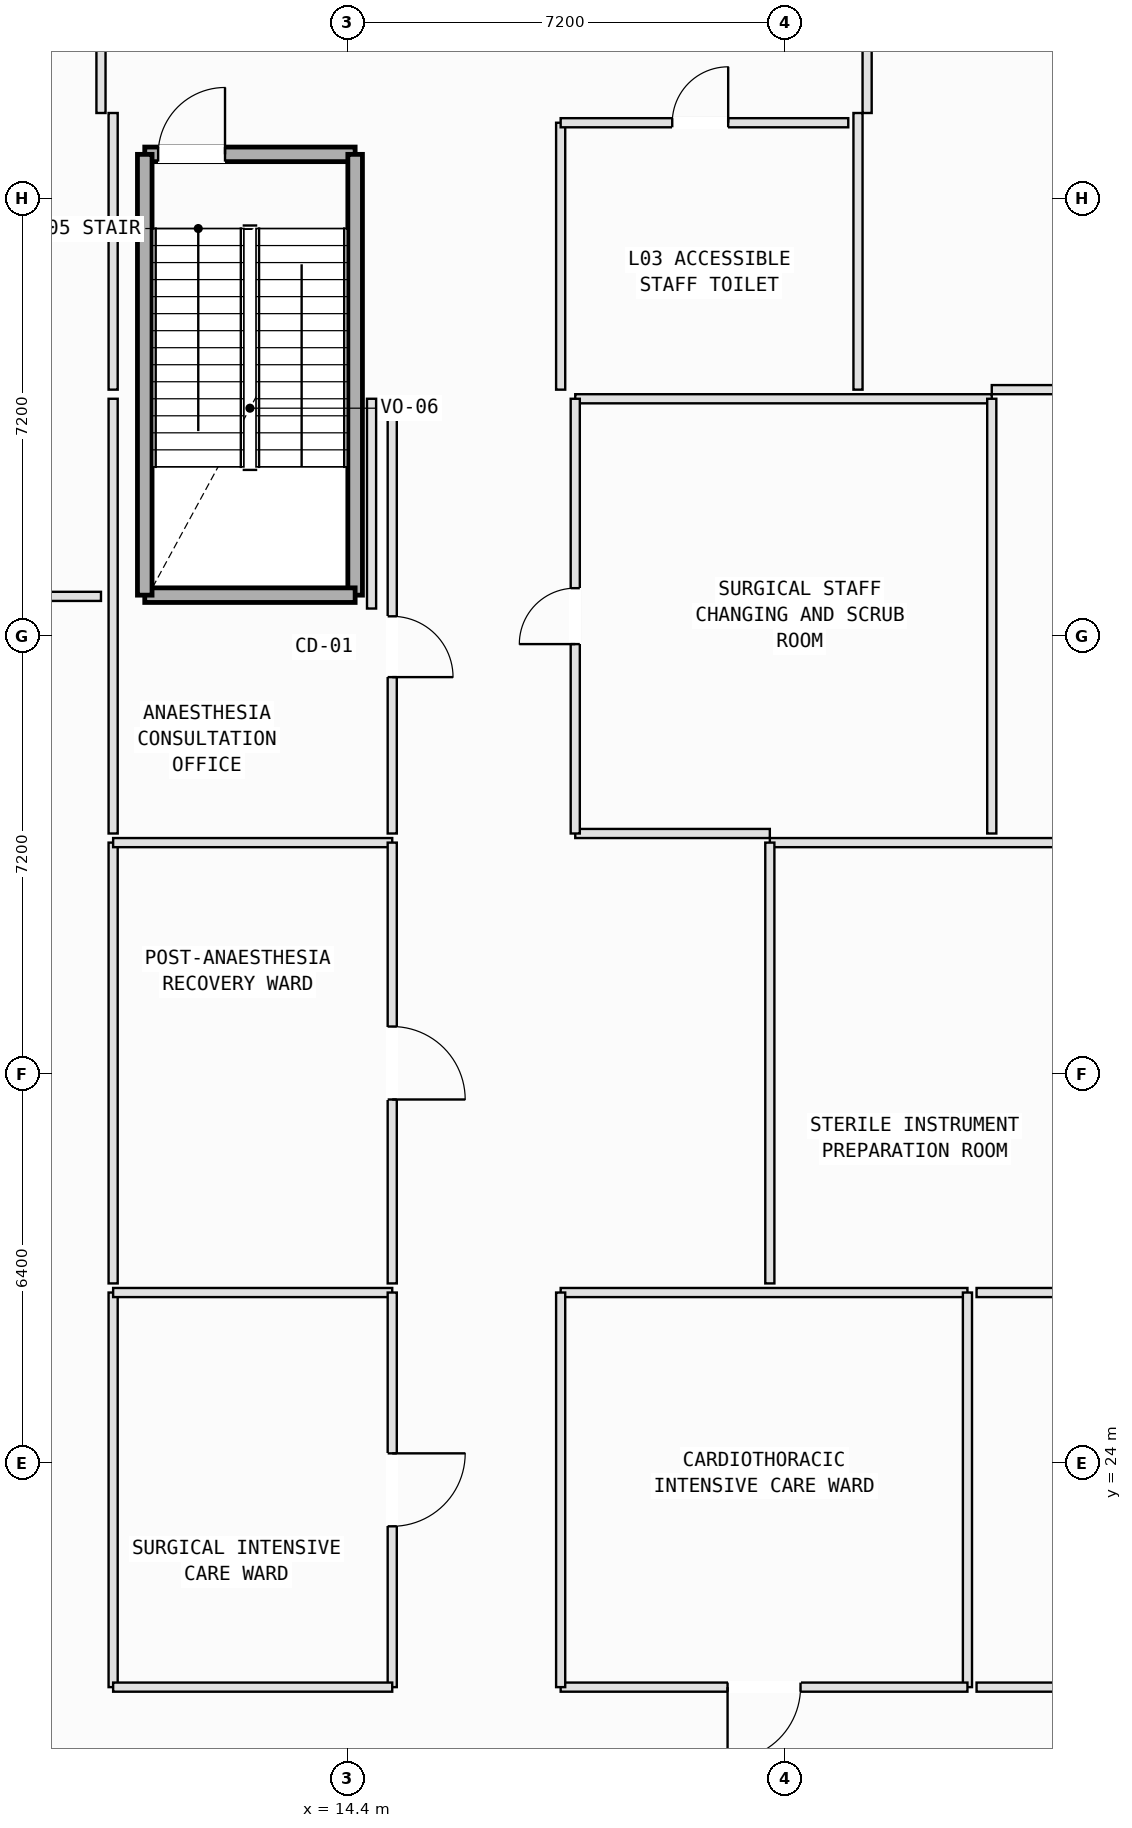
"""IFC4 building model, lengths in metres.
Left out: names, types, materials, properties, quantities, classifications, styles, units other than length and angle.
Written with IfcOpenShell. Run it as: python <this file> out.ifc"""

import sys

from ifc_helpers import new_model, si_unit, direction, frame, frame_2d, origin, place, context, subcontext, project, spatial, rectangle, extrude, element, fill, save


model = new_model("IFC4")
c1 = context("Model", 3, precision=1e-05, world=origin(), true_north=direction((0.0, 1.0)))
c2 = subcontext(c1, "Body", "Model", "MODEL_VIEW")
j1 = project(units=[si_unit("LENGTHUNIT", "METRE"), si_unit("PLANEANGLEUNIT", "RADIAN")], contexts=[c1])
p1 = place(None, origin())
s1 = spatial("IfcSite", under=j1, at=p1, CompositionType="ELEMENT")
p2 = place(p1, origin())
s2 = spatial("IfcBuilding", under=s1, at=p2, CompositionType="ELEMENT")
p3 = place(p2, frame((0.0, 0.0, 16.2)))
s3 = spatial("IfcBuildingStorey", under=s2, at=p3, CompositionType="ELEMENT", Elevation=16.2)
p4 = place(p3, frame((11.07, 45.52, 0.0), z_axis=(0.0, 0.0, 1.0), x_axis=(1.0, 0.0, 0.0)))
e1 = element("IfcWall", 1, at=p4, inside=s3, PredefinedType="SOLIDWALL", context=c2, shape_type="SweptSolid", body=[
    extrude(rectangle(XDim=3.46, YDim=0.24, at=frame_2d((1.73, 0.0))), origin(), (0.0, 0.0, 1.0), 5.15),
])
p5 = place(p4, frame((0.22, 0.0, 0.0)))
e2 = element("IfcOpeningElement", 2, at=p5, cuts=e1, PredefinedType="OPENING", context=c2, shape_type="SweptSolid", body=[
    extrude(rectangle(XDim=1.1, YDim=2.15, at=frame_2d((0.55, 1.075))), frame((0.0, 0.13, 0.0), z_axis=(0.0, -1.0, 0.0), x_axis=(1.0, 0.0, 0.0)), (0.0, 0.0, 1.0), 0.26),
])
p6 = place(p3, frame((14.53, 45.52, 0.0), z_axis=(0.0, 0.0, 1.0), x_axis=(0.0, -1.0, 0.0)))
e3 = element("IfcWall", 3, at=p6, inside=s3, PredefinedType="SOLIDWALL", context=c2, shape_type="SweptSolid", body=[
    extrude(rectangle(XDim=7.25, YDim=0.24, at=frame_2d((3.625, 0.0))), origin(), (0.0, 0.0, 1.0), 5.15),
])
p7 = place(p3, frame((14.53, 38.27, 0.0), z_axis=(0.0, 0.0, 1.0), x_axis=(-1.0, 0.0, 0.0)))
e4 = element("IfcWall", 4, at=p7, inside=s3, PredefinedType="SOLIDWALL", context=c2, shape_type="SweptSolid", body=[
    extrude(rectangle(XDim=3.46, YDim=0.24, at=frame_2d((1.73, 0.0))), origin(), (0.0, 0.0, 1.0), 5.15),
])
p8 = place(p3, frame((11.07, 38.27, 0.0), z_axis=(0.0, 0.0, 1.0), x_axis=(0.0, 1.0, 0.0)))
e5 = element("IfcWall", 5, at=p8, inside=s3, PredefinedType="SOLIDWALL", context=c2, shape_type="SweptSolid", body=[
    extrude(rectangle(XDim=7.25, YDim=0.24, at=frame_2d((3.625, 0.0))), origin(), (0.0, 0.0, 1.0), 5.15),
])
p9 = place(p3, frame((10.55, 20.31, 0.0), z_axis=(0.0, 0.0, 1.0), x_axis=(0.0, 1.0, 0.0)))
e6 = element("IfcWall", 6, at=p9, inside=s3, PredefinedType="PARTITIONING", context=c2, shape_type="SweptSolid", body=[
    extrude(rectangle(XDim=6.49, YDim=0.15, at=frame_2d((3.245, 0.0))), origin(), (0.0, 0.0, 1.0), 5.15),
])
p10 = place(p3, frame((10.55, 26.8, 0.0), z_axis=(0.0, 0.0, 1.0), x_axis=(1.0, 0.0, 0.0)))
e7 = element("IfcWall", 7, at=p10, inside=s3, PredefinedType="PARTITIONING", context=c2, shape_type="SweptSolid", body=[
    extrude(rectangle(XDim=4.59, YDim=0.15, at=frame_2d((2.295, 0.0))), origin(), (0.0, 0.0, 1.0), 5.15),
])
p11 = place(p3, frame((15.14, 26.8, 0.0), z_axis=(0.0, 0.0, 1.0), x_axis=(0.0, -1.0, 0.0)))
e8 = element("IfcWall", 8, at=p11, inside=s3, PredefinedType="PARTITIONING", context=c2, shape_type="SweptSolid", body=[
    extrude(rectangle(XDim=6.49, YDim=0.15, at=frame_2d((3.245, 0.0))), origin(), (0.0, 0.0, 1.0), 5.15),
])
p12 = place(p11, frame((2.645, 0.0, 0.0)))
e9 = element("IfcOpeningElement", 9, at=p12, cuts=e8, PredefinedType="OPENING", context=c2, shape_type="SweptSolid", body=[
    extrude(rectangle(XDim=1.2, YDim=2.15, at=frame_2d((0.6, 1.075))), frame((0.0, 0.085, 0.0), z_axis=(0.0, -1.0, 0.0), x_axis=(1.0, 0.0, 0.0)), (0.0, 0.0, 1.0), 0.17),
])
p13 = place(p3, frame((15.14, 20.31, 0.0), z_axis=(0.0, 0.0, 1.0), x_axis=(-1.0, 0.0, 0.0)))
e10 = element("IfcWall", 10, at=p13, inside=s3, PredefinedType="PARTITIONING", context=c2, shape_type="SweptSolid", body=[
    extrude(rectangle(XDim=4.59, YDim=0.15, at=frame_2d((2.295, 0.0))), origin(), (0.0, 0.0, 1.0), 5.15),
])
p14 = place(p3, frame((17.91, 26.8, 0.0), z_axis=(0.0, 0.0, 1.0), x_axis=(1.0, 0.0, 0.0)))
e11 = element("IfcWall", 11, at=p14, inside=s3, PredefinedType="PARTITIONING", context=c2, shape_type="SweptSolid", body=[
    extrude(rectangle(XDim=6.69, YDim=0.15, at=frame_2d((3.345, 0.0))), origin(), (0.0, 0.0, 1.0), 5.15),
])
p15 = place(p3, frame((24.6, 26.8, 0.0), z_axis=(0.0, 0.0, 1.0), x_axis=(0.0, -1.0, 0.0)))
e12 = element("IfcWall", 12, at=p15, inside=s3, PredefinedType="PARTITIONING", context=c2, shape_type="SweptSolid", body=[
    extrude(rectangle(XDim=6.49, YDim=0.15, at=frame_2d((3.245, 0.0))), origin(), (0.0, 0.0, 1.0), 5.15),
])
p16 = place(p3, frame((24.6, 20.31, 0.0), z_axis=(0.0, 0.0, 1.0), x_axis=(-1.0, 0.0, 0.0)))
e13 = element("IfcWall", 13, at=p16, inside=s3, PredefinedType="PARTITIONING", context=c2, shape_type="SweptSolid", body=[
    extrude(rectangle(XDim=6.69, YDim=0.15, at=frame_2d((3.345, 0.0))), origin(), (0.0, 0.0, 1.0), 5.15),
])
p17 = place(p16, frame((2.745, 0.0, 0.0)))
e14 = element("IfcOpeningElement", 14, at=p17, cuts=e13, PredefinedType="OPENING", context=c2, shape_type="SweptSolid", body=[
    extrude(rectangle(XDim=1.2, YDim=2.15, at=frame_2d((0.6, 1.075))), frame((0.0, 0.085, 0.0), z_axis=(0.0, -1.0, 0.0), x_axis=(1.0, 0.0, 0.0)), (0.0, 0.0, 1.0), 0.17),
])
p18 = place(p3, frame((17.91, 20.31, 0.0), z_axis=(0.0, 0.0, 1.0), x_axis=(0.0, 1.0, 0.0)))
e15 = element("IfcWall", 15, at=p18, inside=s3, PredefinedType="PARTITIONING", context=c2, shape_type="SweptSolid", body=[
    extrude(rectangle(XDim=6.49, YDim=0.15, at=frame_2d((3.245, 0.0))), origin(), (0.0, 0.0, 1.0), 5.15),
])
p19 = place(p3, frame((24.75, 26.8, 0.0), z_axis=(0.0, 0.0, 1.0), x_axis=(1.0, 0.0, 0.0)))
e16 = element("IfcWall", 16, at=p19, inside=s3, PredefinedType="PARTITIONING", context=c2, shape_type="SweptSolid", body=[
    extrude(rectangle(XDim=7.05, YDim=0.15, at=frame_2d((3.525, 0.0))), origin(), (0.0, 0.0, 1.0), 5.15),
])
p20 = place(p3, frame((31.8, 20.31, 0.0), z_axis=(0.0, 0.0, 1.0), x_axis=(-1.0, 0.0, 0.0)))
e17 = element("IfcWall", 17, at=p20, inside=s3, PredefinedType="PARTITIONING", context=c2, shape_type="SweptSolid", body=[
    extrude(rectangle(XDim=7.05, YDim=0.15, at=frame_2d((3.525, 0.0))), origin(), (0.0, 0.0, 1.0), 5.15),
])
p21 = place(p20, frame((2.925, 0.0, 0.0)))
e18 = element("IfcOpeningElement", 18, at=p21, cuts=e17, PredefinedType="OPENING", context=c2, shape_type="SweptSolid", body=[
    extrude(rectangle(XDim=1.2, YDim=2.15, at=frame_2d((0.6, 1.075))), frame((0.0, 0.085, 0.0), z_axis=(0.0, -1.0, 0.0), x_axis=(1.0, 0.0, 0.0)), (0.0, 0.0, 1.0), 0.17),
])
p22 = place(p3, frame((10.55, 26.95, 0.0), z_axis=(0.0, 0.0, 1.0), x_axis=(0.0, 1.0, 0.0)))
e19 = element("IfcWall", 19, at=p22, inside=s3, PredefinedType="PARTITIONING", context=c2, shape_type="SweptSolid", body=[
    extrude(rectangle(XDim=7.25, YDim=0.15, at=frame_2d((3.625, 0.0))), origin(), (0.0, 0.0, 1.0), 5.15),
])
p23 = place(p3, frame((10.55, 34.2, 0.0), z_axis=(0.0, 0.0, 1.0), x_axis=(1.0, 0.0, 0.0)))
e20 = element("IfcWall", 20, at=p23, inside=s3, PredefinedType="PARTITIONING", context=c2, shape_type="SweptSolid", body=[
    extrude(rectangle(XDim=4.59, YDim=0.15, at=frame_2d((2.295, 0.0))), origin(), (0.0, 0.0, 1.0), 5.15),
])
p24 = place(p3, frame((15.14, 34.2, 0.0), z_axis=(0.0, 0.0, 1.0), x_axis=(0.0, -1.0, 0.0)))
e21 = element("IfcWall", 21, at=p24, inside=s3, PredefinedType="PARTITIONING", context=c2, shape_type="SweptSolid", body=[
    extrude(rectangle(XDim=7.25, YDim=0.15, at=frame_2d((3.625, 0.0))), origin(), (0.0, 0.0, 1.0), 5.15),
])
p25 = place(p24, frame((3.025, 0.0, 0.0)))
e22 = element("IfcOpeningElement", 22, at=p25, cuts=e21, PredefinedType="OPENING", context=c2, shape_type="SweptSolid", body=[
    extrude(rectangle(XDim=1.2, YDim=2.15, at=frame_2d((0.6, 1.075))), frame((0.0, 0.085, 0.0), z_axis=(0.0, -1.0, 0.0), x_axis=(1.0, 0.0, 0.0)), (0.0, 0.0, 1.0), 0.17),
])
p26 = place(p3, frame((21.35, 34.2, 0.0), z_axis=(0.0, 0.0, 1.0), x_axis=(1.0, 0.0, 0.0)))
e23 = element("IfcWall", 23, at=p26, inside=s3, PredefinedType="PARTITIONING", context=c2, shape_type="SweptSolid", body=[
    extrude(rectangle(XDim=10.45, YDim=0.15, at=frame_2d((5.225, 0.0))), origin(), (0.0, 0.0, 1.0), 5.15),
])
p27 = place(p3, frame((21.35, 26.95, 0.0), z_axis=(0.0, 0.0, 1.0), x_axis=(0.0, 1.0, 0.0)))
e24 = element("IfcWall", 24, at=p27, inside=s3, PredefinedType="PARTITIONING", context=c2, shape_type="SweptSolid", body=[
    extrude(rectangle(XDim=7.25, YDim=0.15, at=frame_2d((3.625, 0.0))), origin(), (0.0, 0.0, 1.0), 5.15),
])
p28 = place(p3, frame((10.55, 34.35, 0.0), z_axis=(0.0, 0.0, 1.0), x_axis=(0.0, 1.0, 0.0)))
e25 = element("IfcWall", 25, at=p28, inside=s3, PredefinedType="PARTITIONING", context=c2, shape_type="SweptSolid", body=[
    extrude(rectangle(XDim=7.15, YDim=0.15, at=frame_2d((3.575, 0.0))), origin(), (0.0, 0.0, 1.0), 5.15),
])
p29 = place(p3, frame((14.8, 38.05, 0.0), z_axis=(0.0, 0.0, 1.0), x_axis=(0.0, 1.0, 0.0)))
e26 = element("IfcWall", 26, at=p29, inside=s3, PredefinedType="PARTITIONING", context=c2, shape_type="SweptSolid", body=[
    extrude(rectangle(XDim=3.45, YDim=0.15, at=frame_2d((1.725, 0.0))), origin(), (0.0, 0.0, 1.0), 5.15),
])
p30 = place(p3, frame((15.14, 41.5, 0.0), z_axis=(0.0, 0.0, 1.0), x_axis=(0.0, -1.0, 0.0)))
e27 = element("IfcWall", 27, at=p30, inside=s3, PredefinedType="PARTITIONING", context=c2, shape_type="SweptSolid", body=[
    extrude(rectangle(XDim=7.15, YDim=0.15, at=frame_2d((3.575, 0.0))), origin(), (0.0, 0.0, 1.0), 5.15),
])
p31 = place(p30, frame((3.578, 0.0, 0.0)))
e28 = element("IfcOpeningElement", 28, at=p31, cuts=e27, PredefinedType="OPENING", context=c2, shape_type="SweptSolid", body=[
    extrude(rectangle(XDim=1.0, YDim=2.12, at=frame_2d((0.5, 1.06))), frame((0.0, 0.085, 0.0), z_axis=(0.0, -1.0, 0.0), x_axis=(1.0, 0.0, 0.0)), (0.0, 0.0, 1.0), 0.17),
])
p32 = place(p3, frame((18.15, 41.5, 0.0), z_axis=(0.0, 0.0, 1.0), x_axis=(1.0, 0.0, 0.0)))
e29 = element("IfcWall", 29, at=p32, inside=s3, PredefinedType="PARTITIONING", context=c2, shape_type="SweptSolid", body=[
    extrude(rectangle(XDim=6.85, YDim=0.15, at=frame_2d((3.425, 0.0))), origin(), (0.0, 0.0, 1.0), 5.15),
])
p33 = place(p3, frame((25.0, 41.5, 0.0), z_axis=(0.0, 0.0, 1.0), x_axis=(0.0, -1.0, 0.0)))
e30 = element("IfcWall", 30, at=p33, inside=s3, PredefinedType="PARTITIONING", context=c2, shape_type="SweptSolid", body=[
    extrude(rectangle(XDim=7.15, YDim=0.15, at=frame_2d((3.575, 0.0))), origin(), (0.0, 0.0, 1.0), 5.15),
])
p34 = place(p3, frame((21.35, 34.35, 0.0), z_axis=(0.0, 0.0, 1.0), x_axis=(-1.0, 0.0, 0.0)))
e31 = element("IfcWall", 31, at=p34, inside=s3, PredefinedType="PARTITIONING", context=c2, shape_type="SweptSolid", body=[
    extrude(rectangle(XDim=3.2, YDim=0.15, at=frame_2d((1.6, 0.0))), origin(), (0.0, 0.0, 1.0), 5.15),
])
p35 = place(p3, frame((18.15, 34.35, 0.0), z_axis=(0.0, 0.0, 1.0), x_axis=(0.0, 1.0, 0.0)))
e32 = element("IfcWall", 32, at=p35, inside=s3, PredefinedType="PARTITIONING", context=c2, shape_type="SweptSolid", body=[
    extrude(rectangle(XDim=7.15, YDim=0.15, at=frame_2d((3.575, 0.0))), origin(), (0.0, 0.0, 1.0), 5.15),
])
p36 = place(p35, frame((3.115, 0.0, 0.0)))
e33 = element("IfcOpeningElement", 33, at=p36, cuts=e32, PredefinedType="OPENING", context=c2, shape_type="SweptSolid", body=[
    extrude(rectangle(XDim=0.92, YDim=2.1, at=frame_2d((0.46, 1.05))), frame((0.0, 0.085, 0.0), z_axis=(0.0, -1.0, 0.0), x_axis=(1.0, 0.0, 0.0)), (0.0, 0.0, 1.0), 0.17),
])
for number, where, z_axis, x_axis in (
    (34, (10.55, 41.65, 0.0), (0.0, 0.0, 1.0), (0.0, 1.0, 0.0)),
    (35, (22.8, 46.2, 0.0), (0.0, 0.0, 1.0), (0.0, -1.0, 0.0)),
):
    element("IfcWall", number, at=place(p3, frame(where, z_axis=z_axis, x_axis=x_axis)), inside=s3, PredefinedType="PARTITIONING", context=c2, shape_type="SweptSolid", body=[
        extrude(rectangle(XDim=4.55, YDim=0.15, at=frame_2d((2.275, 0.0))), origin(), (0.0, 0.0, 1.0), 5.15),
    ])
p37 = place(p3, frame((17.91, 41.65, 0.0), z_axis=(0.0, 0.0, 1.0), x_axis=(0.0, 1.0, 0.0)))
e36 = element("IfcWall", 36, at=p37, inside=s3, PredefinedType="PARTITIONING", context=c2, shape_type="SweptSolid", body=[
    extrude(rectangle(XDim=4.39, YDim=0.15, at=frame_2d((2.195, 0.0))), origin(), (0.0, 0.0, 1.0), 5.15),
])
p38 = place(p3, frame((17.91, 46.04, 0.0), z_axis=(0.0, 0.0, 1.0), x_axis=(1.0, 0.0, 0.0)))
e37 = element("IfcWall", 37, at=p38, inside=s3, PredefinedType="PARTITIONING", context=c2, shape_type="SweptSolid", body=[
    extrude(rectangle(XDim=4.73, YDim=0.15, at=frame_2d((2.365, 0.0))), origin(), (0.0, 0.0, 1.0), 5.15),
])
p39 = place(p38, frame((1.835, 0.0, 0.0)))
e38 = element("IfcOpeningElement", 38, at=p39, cuts=e37, PredefinedType="OPENING", context=c2, shape_type="SweptSolid", body=[
    extrude(rectangle(XDim=0.92, YDim=2.1, at=frame_2d((0.46, 1.05))), frame((0.0, 0.085, 0.0), z_axis=(0.0, -1.0, 0.0), x_axis=(1.0, 0.0, 0.0)), (0.0, 0.0, 1.0), 0.17),
])
p40 = place(p3, frame((30.35, 41.65, 0.0), z_axis=(0.0, 0.0, 1.0), x_axis=(-1.0, 0.0, 0.0)))
e39 = element("IfcWall", 39, at=p40, inside=s3, PredefinedType="PARTITIONING", context=c2, shape_type="SweptSolid", body=[
    extrude(rectangle(XDim=5.35, YDim=0.15, at=frame_2d((2.675, 0.0))), origin(), (0.0, 0.0, 1.0), 5.15),
])
p41 = place(p3, frame((22.95, 46.2, 0.0), z_axis=(0.0, 0.0, 1.0), x_axis=(0.0, 1.0, 0.0)))
e40 = element("IfcWall", 40, at=p41, inside=s3, PredefinedType="PARTITIONING", context=c2, shape_type="SweptSolid", body=[
    extrude(rectangle(XDim=3.3, YDim=0.15, at=frame_2d((1.65, 0.0))), origin(), (0.0, 0.0, 1.0), 5.15),
])
p42 = place(p41, frame((1.19, 0.0, 0.0)))
e41 = element("IfcOpeningElement", 41, at=p42, cuts=e40, PredefinedType="OPENING", context=c2, shape_type="SweptSolid", body=[
    extrude(rectangle(XDim=0.92, YDim=2.1, at=frame_2d((0.46, 1.05))), frame((0.0, 0.085, 0.0), z_axis=(0.0, -1.0, 0.0), x_axis=(1.0, 0.0, 0.0)), (0.0, 0.0, 1.0), 0.17),
])
p43 = place(p3, frame((10.35, 38.25, 0.0), z_axis=(0.0, 0.0, 1.0), x_axis=(-1.0, 0.0, 0.0)))
e42 = element("IfcWall", 42, at=p43, inside=s3, PredefinedType="PARTITIONING", context=c2, shape_type="SweptSolid", body=[
    extrude(rectangle(XDim=3.73, YDim=0.15, at=frame_2d((1.865, 0.0))), origin(), (0.0, 0.0, 1.0), 5.15),
])
p44 = place(p43, frame((1.405, 0.0, 0.0)))
e43 = element("IfcOpeningElement", 43, at=p44, cuts=e42, PredefinedType="OPENING", context=c2, shape_type="SweptSolid", body=[
    extrude(rectangle(XDim=0.92, YDim=2.1, at=frame_2d((0.46, 1.05))), frame((0.0, 0.085, 0.0), z_axis=(0.0, -1.0, 0.0), x_axis=(1.0, 0.0, 0.0)), (0.0, 0.0, 1.0), 0.17),
])
p45 = place(p3, frame((10.35, 49.5, 0.0), z_axis=(0.0, 0.0, 1.0), x_axis=(0.0, -1.0, 0.0)))
e44 = element("IfcWall", 44, at=p45, inside=s3, PredefinedType="PARTITIONING", context=c2, shape_type="SweptSolid", body=[
    extrude(rectangle(XDim=3.3, YDim=0.15, at=frame_2d((1.65, 0.0))), origin(), (0.0, 0.0, 1.0), 5.15),
])
p46 = place(p5, origin())
e45 = element("IfcDoor", 45, at=p46, inside=s3, OperationType="SINGLE_SWING_RIGHT", PredefinedType="DOOR", context=c2, shape_type="SweptSolid", body=[
    extrude(rectangle(XDim=1.1, YDim=2.15, at=frame_2d((0.55, 1.075))), frame((0.0, 0.025, 0.0), z_axis=(0.0, -1.0, 0.0), x_axis=(1.0, 0.0, 0.0)), (0.0, 0.0, 1.0), 0.05),
])
fill(e2, e45)
p47 = place(p12, origin())
e46 = element("IfcDoor", 46, at=p47, inside=s3, OperationType="SINGLE_SWING_LEFT", PredefinedType="DOOR", context=c2, shape_type="SweptSolid", body=[
    extrude(rectangle(XDim=1.2, YDim=2.15, at=frame_2d((0.6, 1.075))), frame((0.0, 0.025, 0.0), z_axis=(0.0, -1.0, 0.0), x_axis=(1.0, 0.0, 0.0)), (0.0, 0.0, 1.0), 0.05),
])
fill(e9, e46)
p48 = place(p17, origin())
e47 = element("IfcDoor", 47, at=p48, inside=s3, OperationType="SINGLE_SWING_RIGHT", PredefinedType="DOOR", context=c2, shape_type="SweptSolid", body=[
    extrude(rectangle(XDim=1.2, YDim=2.15, at=frame_2d((0.6, 1.075))), frame((0.0, 0.025, 0.0), z_axis=(0.0, -1.0, 0.0), x_axis=(1.0, 0.0, 0.0)), (0.0, 0.0, 1.0), 0.05),
])
fill(e14, e47)
p49 = place(p25, origin())
e48 = element("IfcDoor", 48, at=p49, inside=s3, OperationType="SINGLE_SWING_RIGHT", PredefinedType="DOOR", context=c2, shape_type="SweptSolid", body=[
    extrude(rectangle(XDim=1.2, YDim=2.15, at=frame_2d((0.6, 1.075))), frame((0.0, 0.025, 0.0), z_axis=(0.0, -1.0, 0.0), x_axis=(1.0, 0.0, 0.0)), (0.0, 0.0, 1.0), 0.05),
])
fill(e22, e48)
p50 = place(p31, origin())
e49 = element("IfcDoor", 49, at=p50, inside=s3, OperationType="SINGLE_SWING_RIGHT", PredefinedType="DOOR", context=c2, shape_type="SweptSolid", body=[
    extrude(rectangle(XDim=1.0, YDim=2.12, at=frame_2d((0.5, 1.06))), frame((0.0, 0.025, 0.0), z_axis=(0.0, -1.0, 0.0), x_axis=(1.0, 0.0, 0.0)), (0.0, 0.0, 1.0), 0.05),
])
fill(e28, e49)
p51 = place(p36, origin())
e50 = element("IfcDoor", 50, at=p51, inside=s3, OperationType="SINGLE_SWING_LEFT", PredefinedType="DOOR", context=c2, shape_type="SweptSolid", body=[
    extrude(rectangle(XDim=0.92, YDim=2.1, at=frame_2d((0.46, 1.05))), frame((0.0, 0.025, 0.0), z_axis=(0.0, -1.0, 0.0), x_axis=(1.0, 0.0, 0.0)), (0.0, 0.0, 1.0), 0.05),
])
fill(e33, e50)
p52 = place(p39, origin())
e51 = element("IfcDoor", 51, at=p52, inside=s3, OperationType="SINGLE_SWING_RIGHT", PredefinedType="DOOR", context=c2, shape_type="SweptSolid", body=[
    extrude(rectangle(XDim=0.92, YDim=2.1, at=frame_2d((0.46, 1.05))), frame((0.0, 0.025, 0.0), z_axis=(0.0, -1.0, 0.0), x_axis=(1.0, 0.0, 0.0)), (0.0, 0.0, 1.0), 0.05),
])
fill(e38, e51)
save(model, sys.argv[1])
